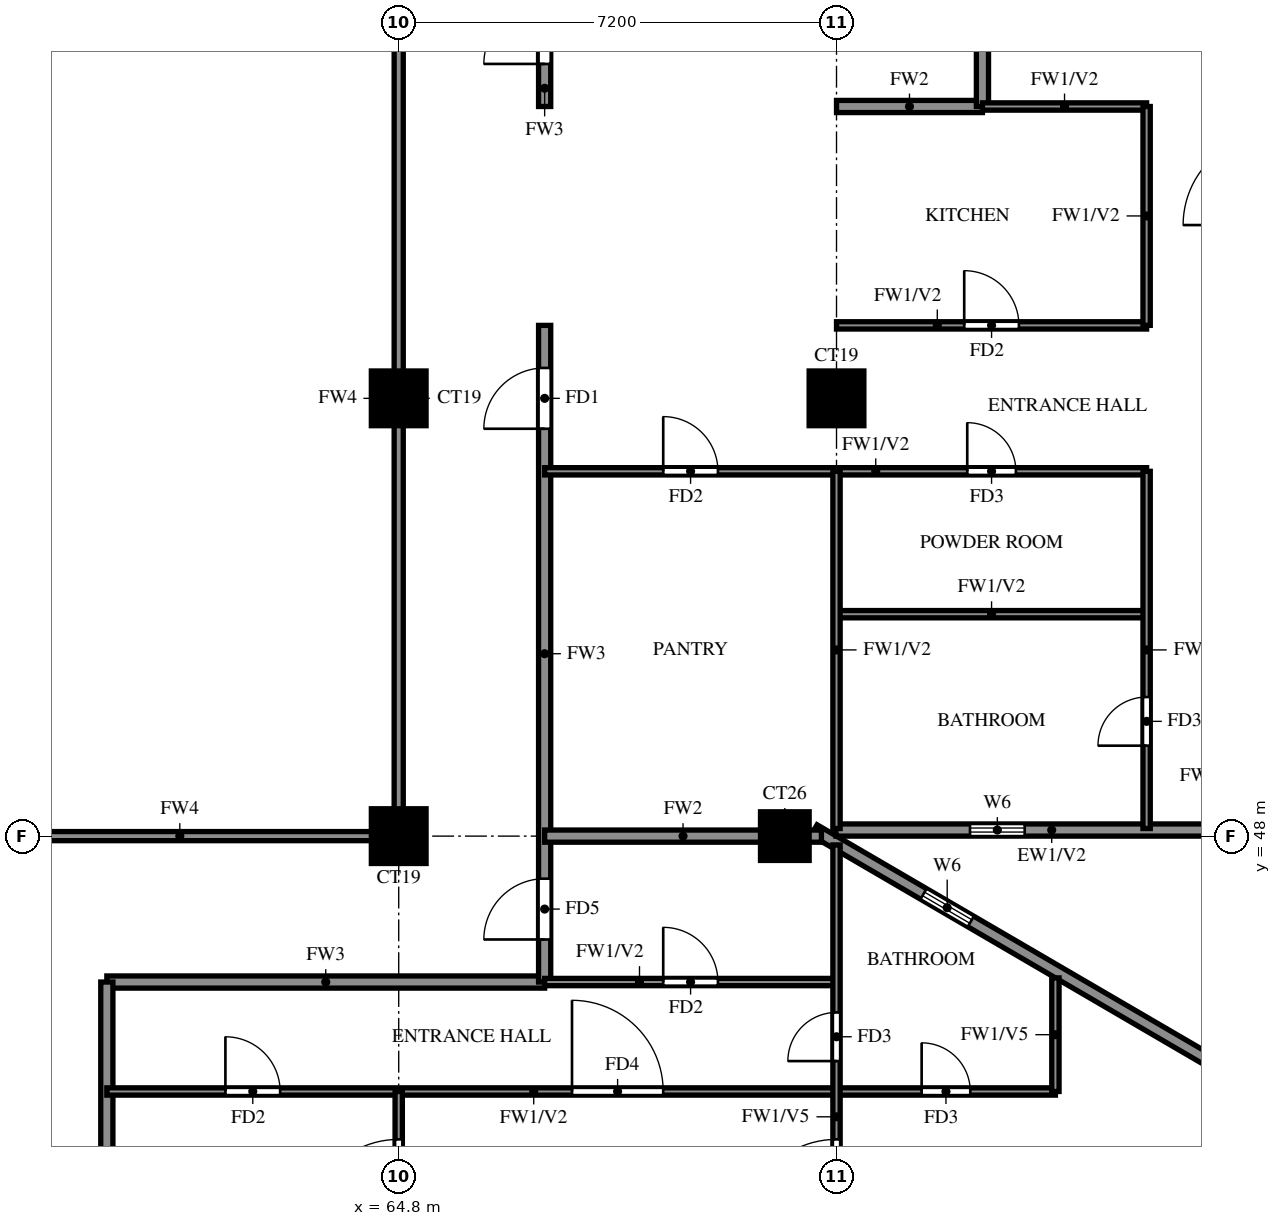
"""IFC4 building model, lengths in metres.
Left out: names, types, materials, properties, quantities, classifications, styles, units other than length and angle.
Written with IfcOpenShell. Run it as: python <this file> out.ifc"""

import sys

from ifc_helpers import new_model, si_unit, direction, frame, frame_2d, origin, origin_2d, place, context, subcontext, project, spatial, rectangle, extrude, source, transform, mapped, element, fill, save


model = new_model("IFC4")
c1 = context("Model", 3, precision=1e-05, world=origin(), true_north=direction((0.0, 1.0)))
c2 = subcontext(c1, "Body", "Model", "MODEL_VIEW")
j1 = project(units=[si_unit("LENGTHUNIT", "METRE"), si_unit("PLANEANGLEUNIT", "RADIAN")], contexts=[c1])
p1 = place(None, origin())
s1 = spatial("IfcSite", under=j1, at=p1, CompositionType="ELEMENT")
p2 = place(p1, origin())
s2 = spatial("IfcBuilding", under=s1, at=p2, CompositionType="ELEMENT")
p3 = place(p2, frame((0.0, 0.0, 199.0)))
s3 = spatial("IfcBuildingStorey", under=s2, at=p3, CompositionType="ELEMENT", Elevation=199.0)
m1 = source(origin(), c2, "Body", "SweptSolid", [
    extrude(rectangle(XDim=0.9, YDim=0.9, at=origin_2d()), origin(), (0.0, 0.0, 1.0), 3.2),
])
p4 = place(p3, frame((64.8, 48.0, 0.0), z_axis=(0.0, 0.0, 1.0), x_axis=(1.0, 0.0, 0.0)))
e1 = element("IfcColumn", 1, at=p4, inside=s3, PredefinedType="COLUMN", context=c2, shape_type="MappedRepresentation", body=[
    mapped(m1, transform((0.0, 0.0, 0.0))),
])
m2 = source(origin(), c2, "Body", "SweptSolid", [
    extrude(rectangle(XDim=0.8, YDim=0.8, at=origin_2d()), origin(), (0.0, 0.0, 1.0), 3.2),
])
p5 = place(p3, frame((71.15, 48.0, 0.0), z_axis=(0.0, 0.0, 1.0), x_axis=(1.0, 0.0, 0.0)))
e2 = element("IfcColumn", 2, at=p5, inside=s3, PredefinedType="COLUMN", context=c2, shape_type="MappedRepresentation", body=[
    mapped(m2, transform((0.0, 0.0, 0.0))),
])
for number, where, z_axis, x_axis in (
    (3, (64.8, 55.2, 0.0), (0.0, 0.0, 1.0), (1.0, 0.0, 0.0)),
    (4, (72.0, 55.2, 0.0), (0.0, 0.0, 1.0), (1.0, 0.0, 0.0)),
):
    element("IfcColumn", number, at=place(p3, frame(where, z_axis=z_axis, x_axis=x_axis)), inside=s3, PredefinedType="COLUMN", context=c2, shape_type="MappedRepresentation", body=[
        mapped(m1, transform((0.0, 0.0, 0.0))),
    ])
p6 = place(p3, frame((85.719, 39.881, 0.0), z_axis=(0.0, 0.0, 1.0), x_axis=(-0.86377618652, 0.503875678716, 0.0)))
e5 = element("IfcWall", 5, at=p6, inside=s3, PredefinedType="SOLIDWALL", context=c2, shape_type="SweptSolid", body=[
    extrude(rectangle(XDim=16.311, YDim=0.2, at=frame_2d((8.156, 0.0))), origin(), (0.0, 0.0, 1.0), 3.2),
])
p7 = place(p6, frame((13.326, 0.0, 1.5)))
e6 = element("IfcOpeningElement", 6, at=p7, cuts=e5, PredefinedType="OPENING", context=c2, shape_type="SweptSolid", body=[
    extrude(rectangle(XDim=0.9, YDim=0.9, at=frame_2d((0.45, 0.45))), frame((0.0, 0.11, 0.0), z_axis=(0.0, -1.0, 0.0), x_axis=(1.0, 0.0, 0.0)), (0.0, 0.0, 1.0), 0.22),
])
p8 = place(p3, frame((71.99, 48.1, 0.0), z_axis=(0.0, 0.0, 1.0), x_axis=(1.0, 0.0, 0.0)))
e7 = element("IfcWall", 7, at=p8, inside=s3, PredefinedType="SOLIDWALL", context=c2, shape_type="SweptSolid", body=[
    extrude(rectangle(XDim=6.76, YDim=0.2, at=frame_2d((3.38, 0.0))), origin(), (0.0, 0.0, 1.0), 3.2),
])
p9 = place(p8, frame((2.205, 0.0, 1.5)))
e8 = element("IfcOpeningElement", 8, at=p9, cuts=e7, PredefinedType="OPENING", context=c2, shape_type="SweptSolid", body=[
    extrude(rectangle(XDim=0.9, YDim=0.9, at=frame_2d((0.45, 0.45))), frame((0.0, 0.11, 0.0), z_axis=(0.0, -1.0, 0.0), x_axis=(1.0, 0.0, 0.0)), (0.0, 0.0, 1.0), 0.22),
])
p10 = place(p3, frame((60.0, 45.6, 0.0), z_axis=(0.0, 0.0, 1.0), x_axis=(1.0, 0.0, 0.0)))
e9 = element("IfcWall", 9, at=p10, inside=s3, PredefinedType="SOLIDWALL", context=c2, shape_type="SweptSolid", body=[
    extrude(rectangle(XDim=7.2, YDim=0.2, at=frame_2d((3.6, 0.0))), origin(), (0.0, 0.0, 1.0), 3.2),
])
p11 = place(p3, frame((60.0, 39.725, 0.0), z_axis=(0.0, 0.0, 1.0), x_axis=(0.0, 1.0, 0.0)))
e10 = element("IfcWall", 10, at=p11, inside=s3, PredefinedType="SOLIDWALL", context=c2, shape_type="SweptSolid", body=[
    extrude(rectangle(XDim=5.875, YDim=0.2, at=frame_2d((2.938, 0.0))), origin(), (0.0, 0.0, 1.0), 3.2),
])
p12 = place(p3, frame((67.2, 45.6, 0.0), z_axis=(0.0, 0.0, 1.0), x_axis=(0.0, 1.0, 0.0)))
e11 = element("IfcWall", 11, at=p12, inside=s3, PredefinedType="SOLIDWALL", context=c2, shape_type="SweptSolid", body=[
    extrude(rectangle(XDim=10.8, YDim=0.2, at=frame_2d((5.4, 0.0))), origin(), (0.0, 0.0, 1.0), 3.2),
])
p13 = place(p12, frame((9.1, 0.0, 0.0)))
e12 = element("IfcOpeningElement", 12, at=p13, cuts=e11, PredefinedType="OPENING", context=c2, shape_type="SweptSolid", body=[
    extrude(rectangle(XDim=1.0, YDim=2.1, at=frame_2d((0.5, 1.05))), frame((0.0, 0.11, 0.0), z_axis=(0.0, -1.0, 0.0), x_axis=(1.0, 0.0, 0.0)), (0.0, 0.0, 1.0), 0.22),
])
p14 = place(p12, frame((0.7, 0.0, 0.0)))
e13 = element("IfcOpeningElement", 13, at=p14, cuts=e11, PredefinedType="OPENING", context=c2, shape_type="SweptSolid", body=[
    extrude(rectangle(XDim=1.0, YDim=2.1, at=frame_2d((0.5, 1.05))), frame((0.0, 0.11, 0.0), z_axis=(0.0, -1.0, 0.0), x_axis=(1.0, 0.0, 0.0)), (0.0, 0.0, 1.0), 0.22),
])
p15 = place(p3, frame((67.2, 60.0, 0.0), z_axis=(0.0, 0.0, 1.0), x_axis=(0.0, 1.0, 0.0)))
e14 = element("IfcWall", 14, at=p15, inside=s3, PredefinedType="SOLIDWALL", context=c2, shape_type="SweptSolid", body=[
    extrude(rectangle(XDim=2.4, YDim=0.2, at=frame_2d((1.2, 0.0))), origin(), (0.0, 0.0, 1.0), 3.2),
])
p16 = place(p15, frame((0.7, 0.0, 0.0)))
e15 = element("IfcOpeningElement", 15, at=p16, cuts=e14, PredefinedType="OPENING", context=c2, shape_type="SweptSolid", body=[
    extrude(rectangle(XDim=1.0, YDim=2.1, at=frame_2d((0.5, 1.05))), frame((0.0, 0.11, 0.0), z_axis=(0.0, -1.0, 0.0), x_axis=(1.0, 0.0, 0.0)), (0.0, 0.0, 1.0), 0.22),
])
p17 = place(p3, frame((67.2, 48.0, 0.0), z_axis=(0.0, 0.0, 1.0), x_axis=(1.0, 0.0, 0.0)))
e16 = element("IfcWall", 16, at=p17, inside=s3, PredefinedType="SOLIDWALL", context=c2, shape_type="SweptSolid", body=[
    extrude(rectangle(XDim=4.552, YDim=0.2, at=frame_2d((2.276, 0.0))), origin(), (0.0, 0.0, 1.0), 3.2),
])
for number, where, z_axis, x_axis in (
    (17, (72.0, 60.0, 0.0), (0.0, 0.0, 1.0), (1.0, 0.0, 0.0)),
    (18, (74.4, 60.0, 0.0), (0.0, 0.0, 1.0), (0.0, 1.0, 0.0)),
):
    element("IfcWall", number, at=place(p3, frame(where, z_axis=z_axis, x_axis=x_axis)), inside=s3, PredefinedType="SOLIDWALL", context=c2, shape_type="SweptSolid", body=[
        extrude(rectangle(XDim=2.4, YDim=0.2, at=frame_2d((1.2, 0.0))), origin(), (0.0, 0.0, 1.0), 3.2),
    ])
p18 = place(p3, frame((60.0, 43.8, 0.0), z_axis=(0.0, 0.0, 1.0), x_axis=(1.0, 0.0, 0.0)))
e19 = element("IfcWall", 19, at=p18, inside=s3, PredefinedType="PARTITIONING", context=c2, shape_type="SweptSolid", body=[
    extrude(rectangle(XDim=15.6, YDim=0.12, at=frame_2d((7.8, 0.0))), origin(), (0.0, 0.0, 1.0), 3.2),
])
p19 = place(p18, frame((7.65, 0.0, 0.0)))
e20 = element("IfcOpeningElement", 20, at=p19, cuts=e19, PredefinedType="OPENING", context=c2, shape_type="SweptSolid", body=[
    extrude(rectangle(XDim=1.5, YDim=2.1, at=frame_2d((0.75, 1.05))), frame((0.0, 0.07, 0.0), z_axis=(0.0, -1.0, 0.0), x_axis=(1.0, 0.0, 0.0)), (0.0, 0.0, 1.0), 0.14),
])
p20 = place(p18, frame((1.95, 0.0, 0.0)))
e21 = element("IfcOpeningElement", 21, at=p20, cuts=e19, PredefinedType="OPENING", context=c2, shape_type="SweptSolid", body=[
    extrude(rectangle(XDim=0.9, YDim=2.1, at=frame_2d((0.45, 1.05))), frame((0.0, 0.07, 0.0), z_axis=(0.0, -1.0, 0.0), x_axis=(1.0, 0.0, 0.0)), (0.0, 0.0, 1.0), 0.14),
])
p21 = place(p18, frame((13.4, 0.0, 0.0)))
e22 = element("IfcOpeningElement", 22, at=p21, cuts=e19, PredefinedType="OPENING", context=c2, shape_type="SweptSolid", body=[
    extrude(rectangle(XDim=0.8, YDim=2.1, at=frame_2d((0.4, 1.05))), frame((0.0, 0.07, 0.0), z_axis=(0.0, -1.0, 0.0), x_axis=(1.0, 0.0, 0.0)), (0.0, 0.0, 1.0), 0.14),
])
p22 = place(p3, frame((67.2, 45.6, 0.0), z_axis=(0.0, 0.0, 1.0), x_axis=(1.0, 0.0, 0.0)))
e23 = element("IfcWall", 23, at=p22, inside=s3, PredefinedType="PARTITIONING", context=c2, shape_type="SweptSolid", body=[
    extrude(rectangle(XDim=4.8, YDim=0.12, at=frame_2d((2.4, 0.0))), origin(), (0.0, 0.0, 1.0), 3.2),
])
p23 = place(p22, frame((1.95, 0.0, 0.0)))
e24 = element("IfcOpeningElement", 24, at=p23, cuts=e23, PredefinedType="OPENING", context=c2, shape_type="SweptSolid", body=[
    extrude(rectangle(XDim=0.9, YDim=2.1, at=frame_2d((0.45, 1.05))), frame((0.0, 0.07, 0.0), z_axis=(0.0, -1.0, 0.0), x_axis=(1.0, 0.0, 0.0)), (0.0, 0.0, 1.0), 0.14),
])
p24 = place(p3, frame((72.0, 51.65, 0.0), z_axis=(0.0, 0.0, 1.0), x_axis=(1.0, 0.0, 0.0)))
e25 = element("IfcWall", 25, at=p24, inside=s3, PredefinedType="PARTITIONING", context=c2, shape_type="SweptSolid", body=[
    extrude(rectangle(XDim=5.1, YDim=0.12, at=frame_2d((2.55, 0.0))), origin(), (0.0, 0.0, 1.0), 3.2),
])
p25 = place(p3, frame((67.2, 54.0, 0.0), z_axis=(0.0, 0.0, 1.0), x_axis=(1.0, 0.0, 0.0)))
e26 = element("IfcWall", 26, at=p25, inside=s3, PredefinedType="PARTITIONING", context=c2, shape_type="SweptSolid", body=[
    extrude(rectangle(XDim=9.9, YDim=0.12, at=frame_2d((4.95, 0.0))), origin(), (0.0, 0.0, 1.0), 3.2),
])
p26 = place(p25, frame((6.95, 0.0, 0.0)))
e27 = element("IfcOpeningElement", 27, at=p26, cuts=e26, PredefinedType="OPENING", context=c2, shape_type="SweptSolid", body=[
    extrude(rectangle(XDim=0.8, YDim=2.1, at=frame_2d((0.4, 1.05))), frame((0.0, 0.07, 0.0), z_axis=(0.0, -1.0, 0.0), x_axis=(1.0, 0.0, 0.0)), (0.0, 0.0, 1.0), 0.14),
])
p27 = place(p25, frame((1.95, 0.0, 0.0)))
e28 = element("IfcOpeningElement", 28, at=p27, cuts=e26, PredefinedType="OPENING", context=c2, shape_type="SweptSolid", body=[
    extrude(rectangle(XDim=0.9, YDim=2.1, at=frame_2d((0.45, 1.05))), frame((0.0, 0.07, 0.0), z_axis=(0.0, -1.0, 0.0), x_axis=(1.0, 0.0, 0.0)), (0.0, 0.0, 1.0), 0.14),
])
p28 = place(p3, frame((72.0, 56.4, 0.0), z_axis=(0.0, 0.0, 1.0), x_axis=(1.0, 0.0, 0.0)))
e29 = element("IfcWall", 29, at=p28, inside=s3, PredefinedType="PARTITIONING", context=c2, shape_type="SweptSolid", body=[
    extrude(rectangle(XDim=5.1, YDim=0.12, at=frame_2d((2.55, 0.0))), origin(), (0.0, 0.0, 1.0), 3.2),
])
p29 = place(p28, frame((2.1, 0.0, 0.0)))
e30 = element("IfcOpeningElement", 30, at=p29, cuts=e29, PredefinedType="OPENING", context=c2, shape_type="SweptSolid", body=[
    extrude(rectangle(XDim=0.9, YDim=2.1, at=frame_2d((0.45, 1.05))), frame((0.0, 0.07, 0.0), z_axis=(0.0, -1.0, 0.0), x_axis=(1.0, 0.0, 0.0)), (0.0, 0.0, 1.0), 0.14),
])
p30 = place(p3, frame((74.4, 60.0, 0.0), z_axis=(0.0, 0.0, 1.0), x_axis=(1.0, 0.0, 0.0)))
e31 = element("IfcWall", 31, at=p30, inside=s3, PredefinedType="PARTITIONING", context=c2, shape_type="SweptSolid", body=[
    extrude(rectangle(XDim=2.7, YDim=0.12, at=frame_2d((1.35, 0.0))), origin(), (0.0, 0.0, 1.0), 3.2),
])
p31 = place(p3, frame((64.8, 39.725, 0.0), z_axis=(0.0, 0.0, 1.0), x_axis=(0.0, 1.0, 0.0)))
e32 = element("IfcWall", 32, at=p31, inside=s3, PredefinedType="PARTITIONING", context=c2, shape_type="SweptSolid", body=[
    extrude(rectangle(XDim=4.075, YDim=0.12, at=frame_2d((2.038, 0.0))), origin(), (0.0, 0.0, 1.0), 3.2),
])
p32 = place(p31, frame((1.788, 0.0, 0.0)))
e33 = element("IfcOpeningElement", 33, at=p32, cuts=e32, PredefinedType="OPENING", context=c2, shape_type="SweptSolid", body=[
    extrude(rectangle(XDim=1.5, YDim=2.1, at=frame_2d((0.75, 1.05))), frame((0.0, 0.07, 0.0), z_axis=(0.0, -1.0, 0.0), x_axis=(1.0, 0.0, 0.0)), (0.0, 0.0, 1.0), 0.14),
])
p33 = place(p3, frame((72.0, 39.725, 0.0), z_axis=(0.0, 0.0, 1.0), x_axis=(0.0, 1.0, 0.0)))
e34 = element("IfcWall", 34, at=p33, inside=s3, PredefinedType="PARTITIONING", context=c2, shape_type="SweptSolid", body=[
    extrude(rectangle(XDim=8.13, YDim=0.12, at=frame_2d((4.065, 0.0))), origin(), (0.0, 0.0, 1.0), 2.3),
])
p34 = place(p33, frame((1.788, 0.0, 0.0)))
e35 = element("IfcOpeningElement", 35, at=p34, cuts=e34, PredefinedType="OPENING", context=c2, shape_type="SweptSolid", body=[
    extrude(rectangle(XDim=1.5, YDim=2.1, at=frame_2d((0.75, 1.05))), frame((0.0, 0.07, 0.0), z_axis=(0.0, -1.0, 0.0), x_axis=(1.0, 0.0, 0.0)), (0.0, 0.0, 1.0), 0.14),
])
p35 = place(p33, frame((4.575, 0.0, 0.0)))
e36 = element("IfcOpeningElement", 36, at=p35, cuts=e34, PredefinedType="OPENING", context=c2, shape_type="SweptSolid", body=[
    extrude(rectangle(XDim=0.8, YDim=2.1, at=frame_2d((0.4, 1.05))), frame((0.0, 0.07, 0.0), z_axis=(0.0, -1.0, 0.0), x_axis=(1.0, 0.0, 0.0)), (0.0, 0.0, 1.0), 0.14),
])
p36 = place(p3, frame((72.0, 48.125, 0.0), z_axis=(0.0, 0.0, 1.0), x_axis=(0.0, 1.0, 0.0)))
e37 = element("IfcWall", 37, at=p36, inside=s3, PredefinedType="PARTITIONING", context=c2, shape_type="SweptSolid", body=[
    extrude(rectangle(XDim=5.875, YDim=0.12, at=frame_2d((2.938, 0.0))), origin(), (0.0, 0.0, 1.0), 3.2),
])
p37 = place(p3, frame((75.6, 43.8, 0.0), z_axis=(0.0, 0.0, 1.0), x_axis=(0.0, 1.0, 0.0)))
e38 = element("IfcWall", 38, at=p37, inside=s3, PredefinedType="PARTITIONING", context=c2, shape_type="SweptSolid", body=[
    extrude(rectangle(XDim=1.868, YDim=0.12, at=frame_2d((0.934, 0.0))), origin(), (0.0, 0.0, 1.0), 2.3),
])
p38 = place(p3, frame((77.1, 48.125, 0.0), z_axis=(0.0, 0.0, 1.0), x_axis=(0.0, 1.0, 0.0)))
e39 = element("IfcWall", 39, at=p38, inside=s3, PredefinedType="PARTITIONING", context=c2, shape_type="SweptSolid", body=[
    extrude(rectangle(XDim=5.875, YDim=0.12, at=frame_2d((2.938, 0.0))), origin(), (0.0, 0.0, 1.0), 3.2),
])
p39 = place(p38, frame((1.363, 0.0, 0.0)))
e40 = element("IfcOpeningElement", 40, at=p39, cuts=e39, PredefinedType="OPENING", context=c2, shape_type="SweptSolid", body=[
    extrude(rectangle(XDim=0.8, YDim=2.1, at=frame_2d((0.4, 1.05))), frame((0.0, 0.07, 0.0), z_axis=(0.0, -1.0, 0.0), x_axis=(1.0, 0.0, 0.0)), (0.0, 0.0, 1.0), 0.14),
])
p40 = place(p3, frame((77.1, 56.4, 0.0), z_axis=(0.0, 0.0, 1.0), x_axis=(0.0, 1.0, 0.0)))
e41 = element("IfcWall", 41, at=p40, inside=s3, PredefinedType="PARTITIONING", context=c2, shape_type="SweptSolid", body=[
    extrude(rectangle(XDim=3.6, YDim=0.12, at=frame_2d((1.8, 0.0))), origin(), (0.0, 0.0, 1.0), 3.2),
])
p41 = place(p3, frame((57.6, 48.0, 0.0), z_axis=(0.0, 0.0, 1.0), x_axis=(1.0, 0.0, 0.0)))
e42 = element("IfcWall", 42, at=p41, inside=s3, PredefinedType="SOLIDWALL", context=c2, shape_type="SweptSolid", body=[
    extrude(rectangle(XDim=7.2, YDim=0.15, at=frame_2d((3.6, 0.0))), origin(), (0.0, 0.0, 1.0), 2.3),
])
p42 = place(p3, frame((64.8, 48.0, 0.0), z_axis=(0.0, 0.0, 1.0), x_axis=(0.0, 1.0, 0.0)))
e43 = element("IfcWall", 43, at=p42, inside=s3, PredefinedType="SOLIDWALL", context=c2, shape_type="SweptSolid", body=[
    extrude(rectangle(XDim=14.4, YDim=0.15, at=frame_2d((7.2, 0.0))), origin(), (0.0, 0.0, 1.0), 2.3),
])
p43 = place(p7, origin())
e44 = element("IfcWindow", 44, at=p43, inside=s3, PartitioningType="SINGLE_PANEL", PredefinedType="WINDOW", context=c2, shape_type="SweptSolid", body=[
    extrude(rectangle(XDim=0.9, YDim=0.9, at=frame_2d((0.45, 0.45))), frame((0.0, 0.03, 0.0), z_axis=(0.0, -1.0, 0.0), x_axis=(1.0, 0.0, 0.0)), (0.0, 0.0, 1.0), 0.06),
])
fill(e6, e44)
p44 = place(p9, origin())
e45 = element("IfcWindow", 45, at=p44, inside=s3, PartitioningType="SINGLE_PANEL", PredefinedType="WINDOW", context=c2, shape_type="SweptSolid", body=[
    extrude(rectangle(XDim=0.9, YDim=0.9, at=frame_2d((0.45, 0.45))), frame((0.0, 0.03, 0.0), z_axis=(0.0, -1.0, 0.0), x_axis=(1.0, 0.0, 0.0)), (0.0, 0.0, 1.0), 0.06),
])
fill(e8, e45)
p45 = place(p13, origin())
e46 = element("IfcDoor", 46, at=p45, inside=s3, OperationType="SINGLE_SWING_LEFT", PredefinedType="DOOR", context=c2, shape_type="SweptSolid", body=[
    extrude(rectangle(XDim=1.0, YDim=2.1, at=frame_2d((0.5, 1.05))), frame((0.0, 0.025, 0.0), z_axis=(0.0, -1.0, 0.0), x_axis=(1.0, 0.0, 0.0)), (0.0, 0.0, 1.0), 0.05),
])
fill(e12, e46)
p46 = place(p39, origin())
e47 = element("IfcDoor", 47, at=p46, inside=s3, OperationType="SINGLE_SWING_RIGHT", PredefinedType="DOOR", context=c2, shape_type="SweptSolid", body=[
    extrude(rectangle(XDim=0.8, YDim=2.1, at=frame_2d((0.4, 1.05))), frame((0.0, 0.025, 0.0), z_axis=(0.0, -1.0, 0.0), x_axis=(1.0, 0.0, 0.0)), (0.0, 0.0, 1.0), 0.05),
])
fill(e40, e47)
p47 = place(p26, origin())
e48 = element("IfcDoor", 48, at=p47, inside=s3, OperationType="SINGLE_SWING_LEFT", PredefinedType="DOOR", context=c2, shape_type="SweptSolid", body=[
    extrude(rectangle(XDim=0.8, YDim=2.1, at=frame_2d((0.4, 1.05))), frame((0.0, 0.025, 0.0), z_axis=(0.0, -1.0, 0.0), x_axis=(1.0, 0.0, 0.0)), (0.0, 0.0, 1.0), 0.05),
])
fill(e27, e48)
p48 = place(p29, origin())
e49 = element("IfcDoor", 49, at=p48, inside=s3, OperationType="SINGLE_SWING_LEFT", PredefinedType="DOOR", context=c2, shape_type="SweptSolid", body=[
    extrude(rectangle(XDim=0.9, YDim=2.1, at=frame_2d((0.45, 1.05))), frame((0.0, 0.025, 0.0), z_axis=(0.0, -1.0, 0.0), x_axis=(1.0, 0.0, 0.0)), (0.0, 0.0, 1.0), 0.05),
])
fill(e30, e49)
p49 = place(p27, origin())
e50 = element("IfcDoor", 50, at=p49, inside=s3, OperationType="SINGLE_SWING_RIGHT", PredefinedType="DOOR", context=c2, shape_type="SweptSolid", body=[
    extrude(rectangle(XDim=0.9, YDim=2.1, at=frame_2d((0.45, 1.05))), frame((0.0, 0.025, 0.0), z_axis=(0.0, -1.0, 0.0), x_axis=(1.0, 0.0, 0.0)), (0.0, 0.0, 1.0), 0.05),
])
fill(e28, e50)
p50 = place(p16, origin())
e51 = element("IfcDoor", 51, at=p50, inside=s3, OperationType="SINGLE_SWING_LEFT", PredefinedType="DOOR", context=c2, shape_type="SweptSolid", body=[
    extrude(rectangle(XDim=1.0, YDim=2.1, at=frame_2d((0.5, 1.05))), frame((0.0, 0.025, 0.0), z_axis=(0.0, -1.0, 0.0), x_axis=(1.0, 0.0, 0.0)), (0.0, 0.0, 1.0), 0.05),
])
fill(e15, e51)
p51 = place(p32, origin())
e52 = element("IfcDoor", 52, at=p51, inside=s3, OperationType="SINGLE_SWING_RIGHT", PredefinedType="DOOR", context=c2, shape_type="SweptSolid", body=[
    extrude(rectangle(XDim=1.5, YDim=2.1, at=frame_2d((0.75, 1.05))), frame((0.0, 0.025, 0.0), z_axis=(0.0, -1.0, 0.0), x_axis=(1.0, 0.0, 0.0)), (0.0, 0.0, 1.0), 0.05),
])
fill(e33, e52)
p52 = place(p23, origin())
e53 = element("IfcDoor", 53, at=p52, inside=s3, OperationType="SINGLE_SWING_RIGHT", PredefinedType="DOOR", context=c2, shape_type="SweptSolid", body=[
    extrude(rectangle(XDim=0.9, YDim=2.1, at=frame_2d((0.45, 1.05))), frame((0.0, 0.025, 0.0), z_axis=(0.0, -1.0, 0.0), x_axis=(1.0, 0.0, 0.0)), (0.0, 0.0, 1.0), 0.05),
])
fill(e24, e53)
p53 = place(p14, origin())
e54 = element("IfcDoor", 54, at=p53, inside=s3, OperationType="SINGLE_SWING_LEFT", PredefinedType="DOOR", context=c2, shape_type="SweptSolid", body=[
    extrude(rectangle(XDim=1.0, YDim=2.1, at=frame_2d((0.5, 1.05))), frame((0.0, 0.025, 0.0), z_axis=(0.0, -1.0, 0.0), x_axis=(1.0, 0.0, 0.0)), (0.0, 0.0, 1.0), 0.05),
])
fill(e13, e54)
p54 = place(p19, origin())
e55 = element("IfcDoor", 55, at=p54, inside=s3, OperationType="SINGLE_SWING_LEFT", PredefinedType="DOOR", context=c2, shape_type="SweptSolid", body=[
    extrude(rectangle(XDim=1.5, YDim=2.1, at=frame_2d((0.75, 1.05))), frame((0.0, 0.025, 0.0), z_axis=(0.0, -1.0, 0.0), x_axis=(1.0, 0.0, 0.0)), (0.0, 0.0, 1.0), 0.05),
])
fill(e20, e55)
p55 = place(p20, origin())
e56 = element("IfcDoor", 56, at=p55, inside=s3, OperationType="SINGLE_SWING_RIGHT", PredefinedType="DOOR", context=c2, shape_type="SweptSolid", body=[
    extrude(rectangle(XDim=0.9, YDim=2.1, at=frame_2d((0.45, 1.05))), frame((0.0, 0.025, 0.0), z_axis=(0.0, -1.0, 0.0), x_axis=(1.0, 0.0, 0.0)), (0.0, 0.0, 1.0), 0.05),
])
fill(e21, e56)
p56 = place(p34, origin())
e57 = element("IfcDoor", 57, at=p56, inside=s3, OperationType="SINGLE_SWING_RIGHT", PredefinedType="DOOR", context=c2, shape_type="SweptSolid", body=[
    extrude(rectangle(XDim=1.5, YDim=2.1, at=frame_2d((0.75, 1.05))), frame((0.0, 0.025, 0.0), z_axis=(0.0, -1.0, 0.0), x_axis=(1.0, 0.0, 0.0)), (0.0, 0.0, 1.0), 0.05),
])
fill(e35, e57)
p57 = place(p35, origin())
e58 = element("IfcDoor", 58, at=p57, inside=s3, OperationType="SINGLE_SWING_LEFT", PredefinedType="DOOR", context=c2, shape_type="SweptSolid", body=[
    extrude(rectangle(XDim=0.8, YDim=2.1, at=frame_2d((0.4, 1.05))), frame((0.0, 0.025, 0.0), z_axis=(0.0, -1.0, 0.0), x_axis=(1.0, 0.0, 0.0)), (0.0, 0.0, 1.0), 0.05),
])
fill(e36, e58)
p58 = place(p21, origin())
e59 = element("IfcDoor", 59, at=p58, inside=s3, OperationType="SINGLE_SWING_RIGHT", PredefinedType="DOOR", context=c2, shape_type="SweptSolid", body=[
    extrude(rectangle(XDim=0.8, YDim=2.1, at=frame_2d((0.4, 1.05))), frame((0.0, 0.025, 0.0), z_axis=(0.0, -1.0, 0.0), x_axis=(1.0, 0.0, 0.0)), (0.0, 0.0, 1.0), 0.05),
])
fill(e22, e59)
save(model, sys.argv[1])
